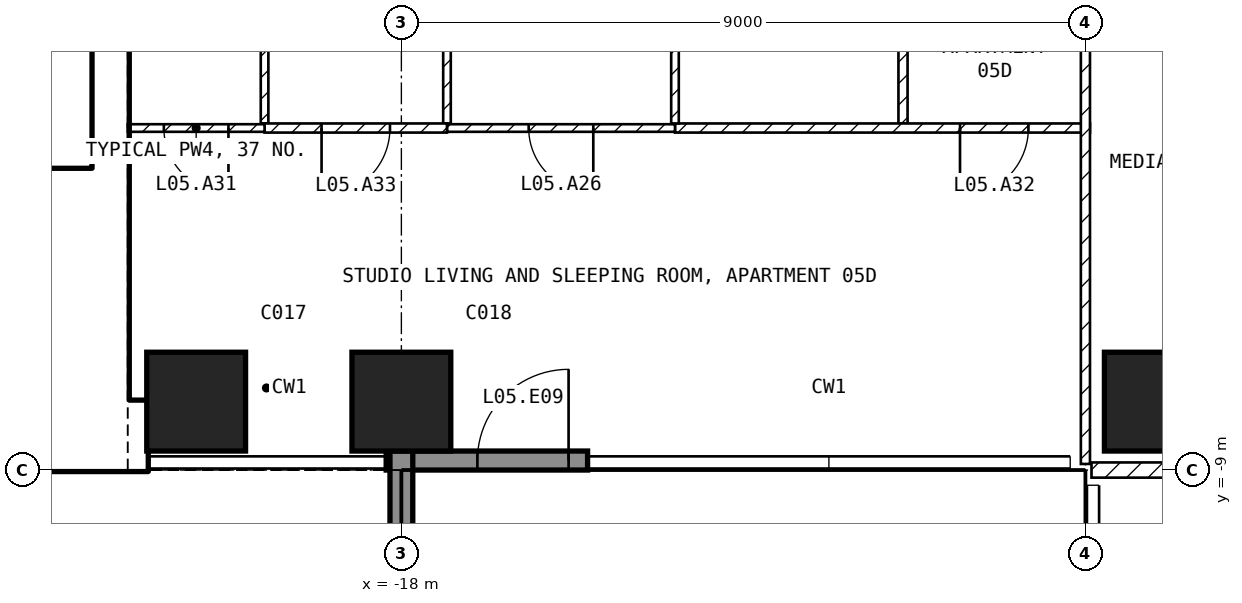
"""IFC4 building model, lengths in metres.
Left out: names, types, materials, properties, quantities, classifications, styles, units other than length and angle.
Written with IfcOpenShell. Run it as: python <this file> out.ifc"""

import sys

from ifc_helpers import new_model, si_unit, direction, frame, frame_2d, origin, origin_2d, place, context, subcontext, project, spatial, rectangle, extrude, element, fill, save


model = new_model("IFC4")
c1 = context("Model", 3, precision=1e-05, world=origin(), true_north=direction((0.0, 1.0)))
c2 = subcontext(c1, "Body", "Model", "MODEL_VIEW")
j1 = project(units=[si_unit("LENGTHUNIT", "METRE"), si_unit("PLANEANGLEUNIT", "RADIAN")], contexts=[c1])
p1 = place(None, origin())
s1 = spatial("IfcSite", under=j1, at=p1, CompositionType="ELEMENT")
p2 = place(p1, origin())
s2 = spatial("IfcBuilding", under=s1, at=p2, CompositionType="ELEMENT")
p3 = place(p2, frame((0.0, 0.0, 36.5)))
s3 = spatial("IfcBuildingStorey", under=s2, at=p3, CompositionType="ELEMENT", Elevation=36.5)
for number, where, z_axis, x_axis in (
    (1, (-20.7, -8.1, -0.25), (0.0, 0.0, 1.0), (1.0, 0.0, 0.0)),
    (2, (-18.0, -8.1, -0.25), (0.0, 0.0, 1.0), (1.0, 0.0, 0.0)),
    (3, (-8.1, -8.1, -0.25), (0.0, 0.0, 1.0), (1.0, 0.0, 0.0)),
):
    element("IfcColumn", number, at=place(p3, frame(where, z_axis=z_axis, x_axis=x_axis)), inside=s3, PredefinedType="COLUMN", context=c2, shape_type="SweptSolid", body=[
        extrude(rectangle(XDim=1.3, YDim=1.3, at=origin_2d()), origin(), (0.0, 0.0, 1.0), 3.5),
    ])
p4 = place(p3, frame((-18.2, -8.875, 0.0), z_axis=(0.0, 0.0, 1.0), x_axis=(1.0, 0.0, 0.0)))
e4 = element("IfcWall", 4, at=p4, inside=s3, PredefinedType="SOLIDWALL", context=c2, shape_type="SweptSolid", body=[
    extrude(rectangle(XDim=2.65, YDim=0.25, at=frame_2d((1.325, 0.0))), origin(), (0.0, 0.0, 1.0), 3.25),
])
p5 = place(p4, frame((1.2, 0.0, 0.0)))
e5 = element("IfcOpeningElement", 5, at=p5, cuts=e4, PredefinedType="OPENING", context=c2, shape_type="SweptSolid", body=[
    extrude(rectangle(XDim=1.2, YDim=2.4, at=frame_2d((0.6, 1.2))), frame((0.0, 0.135, 0.0), z_axis=(0.0, -1.0, 0.0), x_axis=(1.0, 0.0, 0.0)), (0.0, 0.0, 1.0), 0.27),
])
p6 = place(p3, frame((-18.0, -8.75, 0.0), z_axis=(0.0, 0.0, 1.0), x_axis=(0.0, -1.0, 0.0)))
e6 = element("IfcWall", 6, at=p6, inside=s3, PredefinedType="SOLIDWALL", context=c2, shape_type="SweptSolid", body=[
    extrude(rectangle(XDim=2.95, YDim=0.3, at=frame_2d((1.475, 0.0))), origin(), (0.0, 0.0, 1.0), 3.25),
])
p7 = place(p3, frame((-32.4, -8.55, 0.0), z_axis=(0.0, 0.0, 1.0), x_axis=(1.0, 0.0, 0.0)))
e7 = element("IfcWall", 7, at=p7, inside=s3, PredefinedType="SHEAR", context=c2, shape_type="SweptSolid", body=[
    extrude(rectangle(XDim=11.05, YDim=0.9, at=frame_2d((5.525, 0.0))), origin(), (0.0, 0.0, 1.0), 3.25),
])
p8 = place(p3, frame((-21.825, -8.1, 0.0), z_axis=(0.0, 0.0, 1.0), x_axis=(0.0, 1.0, 0.0)))
e8 = element("IfcWall", 8, at=p8, inside=s3, PredefinedType="SHEAR", context=c2, shape_type="SweptSolid", body=[
    extrude(rectangle(XDim=6.9, YDim=0.45, at=frame_2d((3.45, 0.0))), origin(), (0.0, 0.0, 1.0), 3.25),
])
p9 = place(p3, frame((-28.35, -5.15, 0.0), z_axis=(0.0, 0.0, 1.0), x_axis=(1.0, 0.0, 0.0)))
e9 = element("IfcWall", 9, at=p9, inside=s3, PredefinedType="SOLIDWALL", context=c2, shape_type="SweptSolid", body=[
    extrude(rectangle(XDim=6.3, YDim=0.2, at=frame_2d((3.15, 0.0))), origin(), (0.0, 0.0, 1.0), 3.25),
])
p10 = place(p9, frame((5.1, 0.0, 0.0)))
e10 = element("IfcOpeningElement", 10, at=p10, cuts=e9, PredefinedType="OPENING", context=c2, shape_type="SweptSolid", body=[
    extrude(rectangle(XDim=1.0, YDim=2.1, at=frame_2d((0.5, 1.05))), frame((0.0, 0.11, 0.0), z_axis=(0.0, -1.0, 0.0), x_axis=(1.0, 0.0, 0.0)), (0.0, 0.0, 1.0), 0.22),
])
p11 = place(p3, frame((8.92, -9.0, 0.0), z_axis=(0.0, 0.0, 1.0), x_axis=(-1.0, 0.0, 0.0)))
e11 = element("IfcWall", 11, at=p11, inside=s3, PredefinedType="PARTITIONING", context=c2, shape_type="SweptSolid", body=[
    extrude(rectangle(XDim=17.84, YDim=0.2, at=frame_2d((8.92, 0.0))), origin(), (0.0, 0.0, 1.0), 3.25),
])
p12 = place(p11, frame((8.42, 0.0, 0.0)))
e12 = element("IfcOpeningElement", 12, at=p12, cuts=e11, PredefinedType="OPENING", context=c2, shape_type="SweptSolid", body=[
    extrude(rectangle(XDim=1.0, YDim=2.1, at=frame_2d((0.5, 1.05))), frame((0.0, 0.11, 0.0), z_axis=(0.0, -1.0, 0.0), x_axis=(1.0, 0.0, 0.0)), (0.0, 0.0, 1.0), 0.22),
])
p13 = place(p3, frame((-11.4, -4.44, 0.0), z_axis=(0.0, 0.0, 1.0), x_axis=(0.0, 1.0, 0.0)))
e13 = element("IfcWall", 13, at=p13, inside=s3, PredefinedType="PARTITIONING", context=c2, shape_type="SweptSolid", body=[
    extrude(rectangle(XDim=3.14, YDim=0.12, at=frame_2d((1.57, 0.0))), origin(), (0.0, 0.0, 1.0), 3.25),
])
p14 = place(p13, frame((1.12, 0.0, 0.0)))
e14 = element("IfcOpeningElement", 14, at=p14, cuts=e13, PredefinedType="OPENING", context=c2, shape_type="SweptSolid", body=[
    extrude(rectangle(XDim=0.9, YDim=2.1, at=frame_2d((0.45, 1.05))), frame((0.0, 0.07, 0.0), z_axis=(0.0, -1.0, 0.0), x_axis=(1.0, 0.0, 0.0)), (0.0, 0.0, 1.0), 0.14),
])
p15 = place(p3, frame((-8.94, -4.5, 0.0), z_axis=(0.0, 0.0, 1.0), x_axis=(-1.0, 0.0, 0.0)))
e15 = element("IfcWall", 15, at=p15, inside=s3, PredefinedType="PARTITIONING", context=c2, shape_type="SweptSolid", body=[
    extrude(rectangle(XDim=5.46, YDim=0.12, at=frame_2d((2.73, 0.0))), origin(), (0.0, 0.0, 1.0), 3.25),
])
p16 = place(p15, frame((0.81, 0.0, 0.0)))
e16 = element("IfcOpeningElement", 16, at=p16, cuts=e15, PredefinedType="OPENING", context=c2, shape_type="SweptSolid", body=[
    extrude(rectangle(XDim=0.9, YDim=2.1, at=frame_2d((0.45, 1.05))), frame((0.0, 0.07, 0.0), z_axis=(0.0, -1.0, 0.0), x_axis=(1.0, 0.0, 0.0)), (0.0, 0.0, 1.0), 0.14),
])
p17 = place(p3, frame((-9.0, -1.3, 0.0), z_axis=(0.0, 0.0, 1.0), x_axis=(0.0, -1.0, 0.0)))
e17 = element("IfcWall", 17, at=p17, inside=s3, PredefinedType="PARTITIONING", context=c2, shape_type="SweptSolid", body=[
    extrude(rectangle(XDim=7.62, YDim=0.12, at=frame_2d((3.81, 0.0))), origin(), (0.0, 0.0, 1.0), 3.25),
])
p18 = place(p17, frame((1.15, 0.0, 0.0)))
e18 = element("IfcOpeningElement", 18, at=p18, cuts=e17, PredefinedType="OPENING", context=c2, shape_type="SweptSolid", body=[
    extrude(rectangle(XDim=0.9, YDim=2.1, at=frame_2d((0.45, 1.05))), frame((0.0, 0.07, 0.0), z_axis=(0.0, -1.0, 0.0), x_axis=(1.0, 0.0, 0.0)), (0.0, 0.0, 1.0), 0.14),
])
for number, where, z_axis, x_axis in (
    (19, (-14.4, -4.44, 0.0), (0.0, 0.0, 1.0), (0.0, 1.0, 0.0)),
    (20, (-17.4, -4.44, 0.0), (0.0, 0.0, 1.0), (0.0, 1.0, 0.0)),
):
    element("IfcWall", number, at=place(p3, frame(where, z_axis=z_axis, x_axis=x_axis)), inside=s3, PredefinedType="PARTITIONING", context=c2, shape_type="SweptSolid", body=[
        extrude(rectangle(XDim=3.14, YDim=0.1, at=frame_2d((1.57, 0.0))), origin(), (0.0, 0.0, 1.0), 3.25),
    ])
p19 = place(p3, frame((-14.4, -4.5, 0.0), z_axis=(0.0, 0.0, 1.0), x_axis=(-1.0, 0.0, 0.0)))
e21 = element("IfcWall", 21, at=p19, inside=s3, PredefinedType="PARTITIONING", context=c2, shape_type="SweptSolid", body=[
    extrude(rectangle(XDim=3.0, YDim=0.1, at=frame_2d((1.5, 0.0))), origin(), (0.0, 0.0, 1.0), 3.25),
])
p20 = place(p19, frame((1.075, 0.0, 0.0)))
e22 = element("IfcOpeningElement", 22, at=p20, cuts=e21, PredefinedType="OPENING", context=c2, shape_type="SweptSolid", body=[
    extrude(rectangle(XDim=0.85, YDim=2.1, at=frame_2d((0.425, 1.05))), frame((0.0, 0.06, 0.0), z_axis=(0.0, -1.0, 0.0), x_axis=(1.0, 0.0, 0.0)), (0.0, 0.0, 1.0), 0.12),
])
p21 = place(p3, frame((-19.8, -4.44, 0.0), z_axis=(0.0, 0.0, 1.0), x_axis=(0.0, 1.0, 0.0)))
e23 = element("IfcWall", 23, at=p21, inside=s3, PredefinedType="PARTITIONING", context=c2, shape_type="SweptSolid", body=[
    extrude(rectangle(XDim=3.14, YDim=0.1, at=frame_2d((1.57, 0.0))), origin(), (0.0, 0.0, 1.0), 3.25),
])
p22 = place(p3, frame((-17.4, -4.5, 0.0), z_axis=(0.0, 0.0, 1.0), x_axis=(-1.0, 0.0, 0.0)))
e24 = element("IfcWall", 24, at=p22, inside=s3, PredefinedType="PARTITIONING", context=c2, shape_type="SweptSolid", body=[
    extrude(rectangle(XDim=2.4, YDim=0.12, at=frame_2d((1.2, 0.0))), origin(), (0.0, 0.0, 1.0), 3.25),
])
p23 = place(p22, frame((0.75, 0.0, 0.0)))
e25 = element("IfcOpeningElement", 25, at=p23, cuts=e24, PredefinedType="OPENING", context=c2, shape_type="SweptSolid", body=[
    extrude(rectangle(XDim=0.9, YDim=2.1, at=frame_2d((0.45, 1.05))), frame((0.0, 0.07, 0.0), z_axis=(0.0, -1.0, 0.0), x_axis=(1.0, 0.0, 0.0)), (0.0, 0.0, 1.0), 0.14),
])
p24 = place(p3, frame((-19.8, -4.5, 0.0), z_axis=(0.0, 0.0, 1.0), x_axis=(-1.0, 0.0, 0.0)))
e26 = element("IfcWall", 26, at=p24, inside=s3, PredefinedType="PARTITIONING", context=c2, shape_type="SweptSolid", body=[
    extrude(rectangle(XDim=1.8, YDim=0.1, at=frame_2d((0.9, 0.0))), origin(), (0.0, 0.0, 1.0), 3.25),
])
p25 = place(p24, frame((0.475, 0.0, 0.0)))
e27 = element("IfcOpeningElement", 27, at=p25, cuts=e26, PredefinedType="OPENING", context=c2, shape_type="SweptSolid", body=[
    extrude(rectangle(XDim=0.85, YDim=2.1, at=frame_2d((0.425, 1.05))), frame((0.0, 0.06, 0.0), z_axis=(0.0, -1.0, 0.0), x_axis=(1.0, 0.0, 0.0)), (0.0, 0.0, 1.0), 0.12),
])
p26 = place(p5, origin())
e28 = element("IfcDoor", 28, at=p26, inside=s3, OperationType="SINGLE_SWING_RIGHT", PredefinedType="DOOR", context=c2, shape_type="SweptSolid", body=[
    extrude(rectangle(XDim=1.2, YDim=2.4, at=frame_2d((0.6, 1.2))), frame((0.0, 0.025, 0.0), z_axis=(0.0, -1.0, 0.0), x_axis=(1.0, 0.0, 0.0)), (0.0, 0.0, 1.0), 0.05),
])
fill(e5, e28)
p27 = place(p10, origin())
e29 = element("IfcDoor", 29, at=p27, inside=s3, OperationType="SINGLE_SWING_LEFT", PredefinedType="DOOR", context=c2, shape_type="SweptSolid", body=[
    extrude(rectangle(XDim=1.0, YDim=2.1, at=frame_2d((0.5, 1.05))), frame((0.0, 0.025, 0.0), z_axis=(0.0, -1.0, 0.0), x_axis=(1.0, 0.0, 0.0)), (0.0, 0.0, 1.0), 0.05),
])
fill(e10, e29)
p28 = place(p20, origin())
e30 = element("IfcDoor", 30, at=p28, inside=s3, OperationType="SINGLE_SWING_LEFT", PredefinedType="DOOR", context=c2, shape_type="SweptSolid", body=[
    extrude(rectangle(XDim=0.85, YDim=2.1, at=frame_2d((0.425, 1.05))), frame((0.0, 0.025, 0.0), z_axis=(0.0, -1.0, 0.0), x_axis=(1.0, 0.0, 0.0)), (0.0, 0.0, 1.0), 0.05),
])
fill(e22, e30)
p29 = place(p25, origin())
e31 = element("IfcDoor", 31, at=p29, inside=s3, OperationType="SINGLE_SWING_LEFT", PredefinedType="DOOR", context=c2, shape_type="SweptSolid", body=[
    extrude(rectangle(XDim=0.85, YDim=2.1, at=frame_2d((0.425, 1.05))), frame((0.0, 0.025, 0.0), z_axis=(0.0, -1.0, 0.0), x_axis=(1.0, 0.0, 0.0)), (0.0, 0.0, 1.0), 0.05),
])
fill(e27, e31)
p30 = place(p16, origin())
e32 = element("IfcDoor", 32, at=p30, inside=s3, OperationType="SINGLE_SWING_RIGHT", PredefinedType="DOOR", context=c2, shape_type="SweptSolid", body=[
    extrude(rectangle(XDim=0.9, YDim=2.1, at=frame_2d((0.45, 1.05))), frame((0.0, 0.025, 0.0), z_axis=(0.0, -1.0, 0.0), x_axis=(1.0, 0.0, 0.0)), (0.0, 0.0, 1.0), 0.05),
])
fill(e16, e32)
p31 = place(p23, origin())
e33 = element("IfcDoor", 33, at=p31, inside=s3, OperationType="SINGLE_SWING_RIGHT", PredefinedType="DOOR", context=c2, shape_type="SweptSolid", body=[
    extrude(rectangle(XDim=0.9, YDim=2.1, at=frame_2d((0.45, 1.05))), frame((0.0, 0.025, 0.0), z_axis=(0.0, -1.0, 0.0), x_axis=(1.0, 0.0, 0.0)), (0.0, 0.0, 1.0), 0.05),
])
fill(e25, e33)
save(model, sys.argv[1])
